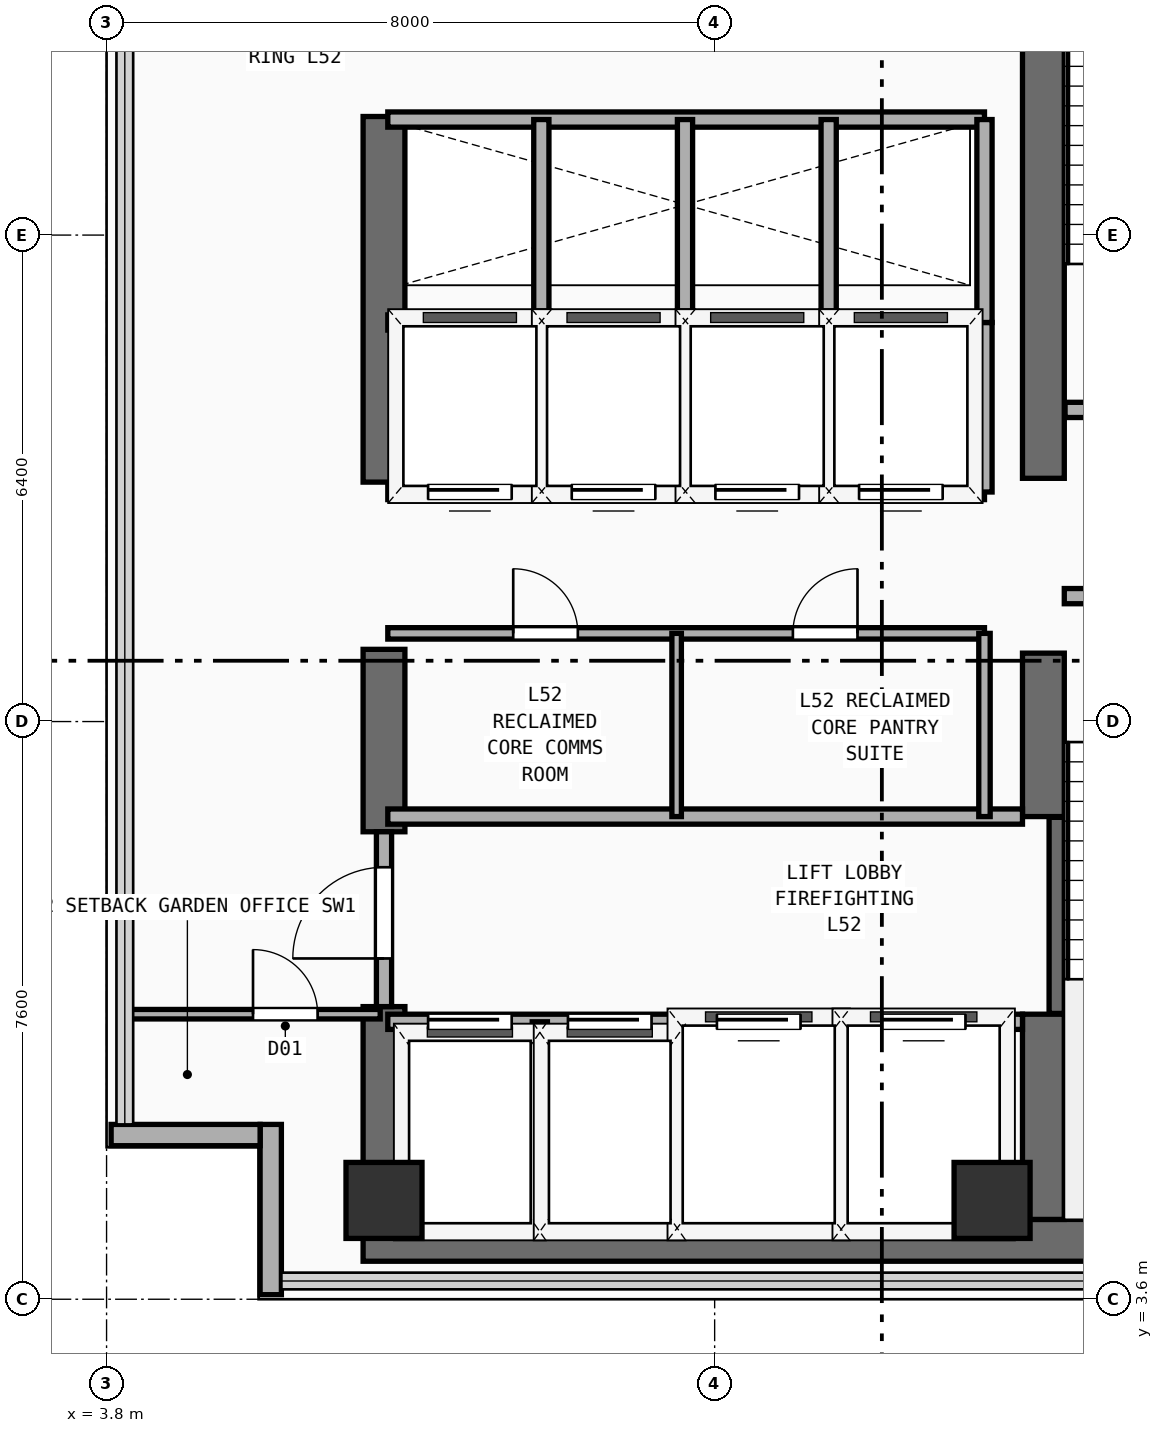
"""IFC4 building model, lengths in metres.
Left out: names, types, materials, properties, quantities, classifications, styles, units other than length and angle.
Written with IfcOpenShell. Run it as: python <this file> out.ifc"""

import sys

from ifc_helpers import new_model, si_unit, direction, frame, frame_2d, origin, origin_2d, place, context, subcontext, project, spatial, rectangle, extrude, element, fill, save


model = new_model("IFC4")
c1 = context("Model", 3, precision=1e-05, world=origin(), true_north=direction((0.0, 1.0)))
c2 = subcontext(c1, "Body", "Model", "MODEL_VIEW")
j1 = project(units=[si_unit("LENGTHUNIT", "METRE"), si_unit("PLANEANGLEUNIT", "RADIAN")], contexts=[c1])
p1 = place(None, origin())
s1 = spatial("IfcSite", under=j1, at=p1, CompositionType="ELEMENT")
p2 = place(p1, origin())
s2 = spatial("IfcBuilding", under=s1, at=p2, CompositionType="ELEMENT")
p3 = place(p2, frame((0.0, 0.0, 204.5)))
s3 = spatial("IfcBuildingStorey", under=s2, at=p3, CompositionType="ELEMENT", Elevation=204.5)
p4 = place(p3, frame((7.175, 4.375, 0.0), z_axis=(0.0, 0.0, 1.0), x_axis=(1.0, 0.0, 0.0)))
e1 = element("IfcWall", 1, at=p4, inside=s3, PredefinedType="SHEAR", context=c2, shape_type="SweptSolid", body=[
    extrude(rectangle(XDim=13.9, YDim=0.55, at=frame_2d((6.95, 0.0))), origin(), (0.0, 0.0, 1.0), 3.56),
])
p5 = place(p3, frame((7.45, 4.65, 0.0), z_axis=(0.0, 0.0, 1.0), x_axis=(0.0, 1.0, 0.0)))
e2 = element("IfcWall", 2, at=p5, inside=s3, PredefinedType="SHEAR", context=c2, shape_type="SweptSolid", body=[
    extrude(rectangle(XDim=2.8, YDim=0.55, at=frame_2d((1.4, 0.0))), origin(), (0.0, 0.0, 1.0), 3.56),
])
p6 = place(p3, frame((7.45, 9.75, 0.0), z_axis=(0.0, 0.0, 1.0), x_axis=(0.0, 1.0, 0.0)))
e3 = element("IfcWall", 3, at=p6, inside=s3, PredefinedType="SHEAR", context=c2, shape_type="SweptSolid", body=[
    extrude(rectangle(XDim=2.4, YDim=0.55, at=frame_2d((1.2, 0.0))), origin(), (0.0, 0.0, 1.0), 3.56),
])
p7 = place(p3, frame((7.45, 14.35, 0.0), z_axis=(0.0, 0.0, 1.0), x_axis=(0.0, 1.0, 0.0)))
e4 = element("IfcWall", 4, at=p7, inside=s3, PredefinedType="SHEAR", context=c2, shape_type="SweptSolid", body=[
    extrude(rectangle(XDim=4.81, YDim=0.55, at=frame_2d((2.405, 0.0))), origin(), (0.0, 0.0, 1.0), 3.56),
])
p8 = place(p3, frame((16.125, 4.65, 0.0), z_axis=(0.0, 0.0, 1.0), x_axis=(0.0, 1.0, 0.0)))
e5 = element("IfcWall", 5, at=p8, inside=s3, PredefinedType="SHEAR", context=c2, shape_type="SweptSolid", body=[
    extrude(rectangle(XDim=2.7, YDim=0.55, at=frame_2d((1.35, 0.0))), origin(), (0.0, 0.0, 1.0), 3.56),
])
p9 = place(p3, frame((16.125, 9.95, 0.0), z_axis=(0.0, 0.0, 1.0), x_axis=(0.0, 1.0, 0.0)))
e6 = element("IfcWall", 6, at=p9, inside=s3, PredefinedType="SHEAR", context=c2, shape_type="SweptSolid", body=[
    extrude(rectangle(XDim=2.15, YDim=0.55, at=frame_2d((1.075, 0.0))), origin(), (0.0, 0.0, 1.0), 3.56),
])
p10 = place(p3, frame((16.125, 14.4, 0.0), z_axis=(0.0, 0.0, 1.0), x_axis=(0.0, 1.0, 0.0)))
e7 = element("IfcWall", 7, at=p10, inside=s3, PredefinedType="SHEAR", context=c2, shape_type="SweptSolid", body=[
    extrude(rectangle(XDim=9.1, YDim=0.55, at=frame_2d((4.55, 0.0))), origin(), (0.0, 0.0, 1.0), 3.56),
])
for number, where, z_axis, x_axis in (
    (8, (7.45, 4.9, 0.0), (0.0, 0.0, 1.0), (1.0, 0.0, 0.0)),
    (9, (15.45, 4.9, 0.0), (0.0, 0.0, 1.0), (1.0, 0.0, 0.0)),
):
    element("IfcColumn", number, at=place(p3, frame(where, z_axis=z_axis, x_axis=x_axis)), inside=s3, PredefinedType="COLUMN", context=c2, shape_type="SweptSolid", body=[
        extrude(rectangle(XDim=1.0, YDim=1.0, at=origin_2d()), origin(), (0.0, 0.0, 1.0), 3.56),
    ])
p11 = place(p3, frame((5.96, 3.66, 0.0), z_axis=(0.0, 0.0, 1.0), x_axis=(0.0, 1.0, 0.0)))
e10 = element("IfcWall", 10, at=p11, inside=s3, PredefinedType="SOLIDWALL", context=c2, shape_type="SweptSolid", body=[
    extrude(rectangle(XDim=2.24, YDim=0.28, at=frame_2d((1.12, 0.0))), origin(), (0.0, 0.0, 1.0), 3.56),
])
p12 = place(p3, frame((3.86, 5.76, 0.0), z_axis=(0.0, 0.0, 1.0), x_axis=(1.0, 0.0, 0.0)))
e11 = element("IfcWall", 11, at=p12, inside=s3, PredefinedType="SOLIDWALL", context=c2, shape_type="SweptSolid", body=[
    extrude(rectangle(XDim=1.96, YDim=0.28, at=frame_2d((0.98, 0.0))), origin(), (0.0, 0.0, 1.0), 3.56),
])
p13 = place(p3, frame((16.3, 7.36, 0.0), z_axis=(0.0, 0.0, 1.0), x_axis=(0.0, 1.0, 0.0)))
e12 = element("IfcWall", 12, at=p13, inside=s3, PredefinedType="SHEAR", context=c2, shape_type="SweptSolid", body=[
    extrude(rectangle(XDim=2.58, YDim=0.2, at=frame_2d((1.29, 0.0))), origin(), (0.0, 0.0, 1.0), 3.56),
])
p14 = place(p3, frame((16.4, 12.85, 0.0), z_axis=(0.0, 0.0, 1.0), x_axis=(1.0, 0.0, 0.0)))
e13 = element("IfcWall", 13, at=p14, inside=s3, PredefinedType="PARTITIONING", context=c2, shape_type="SweptSolid", body=[
    extrude(rectangle(XDim=3.96, YDim=0.2, at=frame_2d((1.98, 0.0))), origin(), (0.0, 0.0, 1.0), 3.56),
])
p15 = place(p14, frame((1.304, 0.0, 0.0)))
e14 = element("IfcOpeningElement", 14, at=p15, cuts=e13, PredefinedType="OPENING", context=c2, shape_type="SweptSolid", body=[
    extrude(rectangle(XDim=1.1, YDim=2.2, at=frame_2d((0.55, 1.1))), frame((0.0, 0.11, 0.0), z_axis=(0.0, -1.0, 0.0), x_axis=(1.0, 0.0, 0.0)), (0.0, 0.0, 1.0), 0.22),
])
p16 = place(p3, frame((16.41, 15.3, 0.0), z_axis=(0.0, 0.0, 1.0), x_axis=(1.0, 0.0, 0.0)))
e15 = element("IfcWall", 15, at=p16, inside=s3, PredefinedType="PARTITIONING", context=c2, shape_type="SweptSolid", body=[
    extrude(rectangle(XDim=3.95, YDim=0.2, at=frame_2d((1.975, 0.0))), origin(), (0.0, 0.0, 1.0), 3.56),
])
p17 = place(p16, frame((1.294, 0.0, 0.0)))
e16 = element("IfcOpeningElement", 16, at=p17, cuts=e15, PredefinedType="OPENING", context=c2, shape_type="SweptSolid", body=[
    extrude(rectangle(XDim=1.1, YDim=2.2, at=frame_2d((0.55, 1.1))), frame((0.0, 0.11, 0.0), z_axis=(0.0, -1.0, 0.0), x_axis=(1.0, 0.0, 0.0)), (0.0, 0.0, 1.0), 0.22),
])
p18 = place(p3, frame((7.5, 7.25, 0.0), z_axis=(0.0, 0.0, 1.0), x_axis=(1.0, 0.0, 0.0)))
e17 = element("IfcWall", 17, at=p18, inside=s3, PredefinedType="PARTITIONING", context=c2, shape_type="SweptSolid", body=[
    extrude(rectangle(XDim=8.35, YDim=0.2, at=frame_2d((4.175, 0.0))), origin(), (0.0, 0.0, 1.0), 3.56),
])
p19 = place(p18, frame((0.53, 0.0, 0.0)))
e18 = element("IfcOpeningElement", 18, at=p19, cuts=e17, PredefinedType="OPENING", context=c2, shape_type="SweptSolid", body=[
    extrude(rectangle(XDim=1.1, YDim=2.2, at=frame_2d((0.55, 1.1))), frame((0.0, 0.11, 0.0), z_axis=(0.0, -1.0, 0.0), x_axis=(1.0, 0.0, 0.0)), (0.0, 0.0, 1.0), 0.22),
])
p20 = place(p18, frame((2.37, 0.0, 0.0)))
e19 = element("IfcOpeningElement", 19, at=p20, cuts=e17, PredefinedType="OPENING", context=c2, shape_type="SweptSolid", body=[
    extrude(rectangle(XDim=1.1, YDim=2.2, at=frame_2d((0.55, 1.1))), frame((0.0, 0.11, 0.0), z_axis=(0.0, -1.0, 0.0), x_axis=(1.0, 0.0, 0.0)), (0.0, 0.0, 1.0), 0.22),
])
p21 = place(p18, frame((4.33, 0.0, 0.0)))
e20 = element("IfcOpeningElement", 20, at=p21, cuts=e17, PredefinedType="OPENING", context=c2, shape_type="SweptSolid", body=[
    extrude(rectangle(XDim=1.1, YDim=2.2, at=frame_2d((0.55, 1.1))), frame((0.0, 0.11, 0.0), z_axis=(0.0, -1.0, 0.0), x_axis=(1.0, 0.0, 0.0)), (0.0, 0.0, 1.0), 0.22),
])
p22 = place(p18, frame((6.5, 0.0, 0.0)))
e21 = element("IfcOpeningElement", 21, at=p22, cuts=e17, PredefinedType="OPENING", context=c2, shape_type="SweptSolid", body=[
    extrude(rectangle(XDim=1.1, YDim=2.2, at=frame_2d((0.55, 1.1))), frame((0.0, 0.11, 0.0), z_axis=(0.0, -1.0, 0.0), x_axis=(1.0, 0.0, 0.0)), (0.0, 0.0, 1.0), 0.22),
])
p23 = place(p3, frame((7.5, 9.95, 0.0), z_axis=(0.0, 0.0, 1.0), x_axis=(1.0, 0.0, 0.0)))
e22 = element("IfcWall", 22, at=p23, inside=s3, PredefinedType="PARTITIONING", context=c2, shape_type="SweptSolid", body=[
    extrude(rectangle(XDim=8.35, YDim=0.2, at=frame_2d((4.175, 0.0))), origin(), (0.0, 0.0, 1.0), 3.56),
])
for number, where, z_axis, x_axis in (
    (23, (9.5, 4.45, 0.0), (0.0, 0.0, 1.0), (0.0, 1.0, 0.0)),
    (24, (11.36, 4.45, 0.0), (0.0, 0.0, 1.0), (0.0, 1.0, 0.0)),
    (25, (13.46, 4.45, 0.0), (0.0, 0.0, 1.0), (0.0, 1.0, 0.0)),
):
    element("IfcWall", number, at=place(p3, frame(where, z_axis=z_axis, x_axis=x_axis)), inside=s3, PredefinedType="PARTITIONING", context=c2, shape_type="SweptSolid", body=[
        extrude(rectangle(XDim=2.8, YDim=0.2, at=frame_2d((1.4, 0.0))), origin(), (0.0, 0.0, 1.0), 3.56),
    ])
p24 = place(p3, frame((7.45, 7.45, 0.0), z_axis=(0.0, 0.0, 1.0), x_axis=(0.0, 1.0, 0.0)))
e26 = element("IfcWall", 26, at=p24, inside=s3, PredefinedType="PARTITIONING", context=c2, shape_type="SweptSolid", body=[
    extrude(rectangle(XDim=2.3, YDim=0.2, at=frame_2d((1.15, 0.0))), origin(), (0.0, 0.0, 1.0), 2.54),
])
p25 = place(p24, frame((0.633, 0.0, 0.0)))
e27 = element("IfcOpeningElement", 27, at=p25, cuts=e26, PredefinedType="OPENING", context=c2, shape_type="SweptSolid", body=[
    extrude(rectangle(XDim=1.2, YDim=2.25, at=frame_2d((0.6, 1.125))), frame((0.0, 0.11, 0.0), z_axis=(0.0, -1.0, 0.0), x_axis=(1.0, 0.0, 0.0)), (0.0, 0.0, 1.0), 0.22),
])
p26 = place(p3, frame((7.5, 12.36, 0.0), z_axis=(0.0, 0.0, 1.0), x_axis=(1.0, 0.0, 0.0)))
e28 = element("IfcWall", 28, at=p26, inside=s3, PredefinedType="PARTITIONING", context=c2, shape_type="SweptSolid", body=[
    extrude(rectangle(XDim=7.85, YDim=0.15, at=frame_2d((3.925, 0.0))), origin(), (0.0, 0.0, 1.0), 3.56),
])
p27 = place(p26, frame((1.65, 0.0, 0.0)))
e29 = element("IfcOpeningElement", 29, at=p27, cuts=e28, PredefinedType="OPENING", context=c2, shape_type="SweptSolid", body=[
    extrude(rectangle(XDim=0.85, YDim=2.15, at=frame_2d((0.425, 1.075))), frame((0.0, 0.085, 0.0), z_axis=(0.0, -1.0, 0.0), x_axis=(1.0, 0.0, 0.0)), (0.0, 0.0, 1.0), 0.17),
])
p28 = place(p26, frame((5.329, 0.0, 0.0)))
e30 = element("IfcOpeningElement", 30, at=p28, cuts=e28, PredefinedType="OPENING", context=c2, shape_type="SweptSolid", body=[
    extrude(rectangle(XDim=0.85, YDim=2.15, at=frame_2d((0.425, 1.075))), frame((0.0, 0.085, 0.0), z_axis=(0.0, -1.0, 0.0), x_axis=(1.0, 0.0, 0.0)), (0.0, 0.0, 1.0), 0.17),
])
p29 = place(p3, frame((15.35, 9.95, 0.0), z_axis=(0.0, 0.0, 1.0), x_axis=(0.0, 1.0, 0.0)))
e31 = element("IfcWall", 31, at=p29, inside=s3, PredefinedType="PARTITIONING", context=c2, shape_type="SweptSolid", body=[
    extrude(rectangle(XDim=2.41, YDim=0.15, at=frame_2d((1.205, 0.0))), origin(), (0.0, 0.0, 1.0), 3.56),
])
p30 = place(p3, frame((11.3, 9.95, 0.0), z_axis=(0.0, 0.0, 1.0), x_axis=(0.0, 1.0, 0.0)))
e32 = element("IfcWall", 32, at=p30, inside=s3, PredefinedType="PARTITIONING", context=c2, shape_type="SweptSolid", body=[
    extrude(rectangle(XDim=2.41, YDim=0.125, at=frame_2d((1.205, 0.0))), origin(), (0.0, 0.0, 1.0), 3.56),
])
p31 = place(p3, frame((7.5, 14.22, 0.0), z_axis=(0.0, 0.0, 1.0), x_axis=(1.0, 0.0, 0.0)))
e33 = element("IfcWall", 33, at=p31, inside=s3, PredefinedType="PARTITIONING", context=c2, shape_type="SweptSolid", body=[
    extrude(rectangle(XDim=7.85, YDim=0.2, at=frame_2d((3.925, 0.0))), origin(), (0.0, 0.0, 1.0), 3.56),
])
p32 = place(p31, frame((0.53, 0.0, 0.0)))
e34 = element("IfcOpeningElement", 34, at=p32, cuts=e33, PredefinedType="OPENING", context=c2, shape_type="SweptSolid", body=[
    extrude(rectangle(XDim=1.1, YDim=2.2, at=frame_2d((0.55, 1.1))), frame((0.0, 0.11, 0.0), z_axis=(0.0, -1.0, 0.0), x_axis=(1.0, 0.0, 0.0)), (0.0, 0.0, 1.0), 0.22),
])
p33 = place(p31, frame((2.42, 0.0, 0.0)))
e35 = element("IfcOpeningElement", 35, at=p33, cuts=e33, PredefinedType="OPENING", context=c2, shape_type="SweptSolid", body=[
    extrude(rectangle(XDim=1.1, YDim=2.2, at=frame_2d((0.55, 1.1))), frame((0.0, 0.11, 0.0), z_axis=(0.0, -1.0, 0.0), x_axis=(1.0, 0.0, 0.0)), (0.0, 0.0, 1.0), 0.22),
])
p34 = place(p31, frame((4.31, 0.0, 0.0)))
e36 = element("IfcOpeningElement", 36, at=p34, cuts=e33, PredefinedType="OPENING", context=c2, shape_type="SweptSolid", body=[
    extrude(rectangle(XDim=1.1, YDim=2.2, at=frame_2d((0.55, 1.1))), frame((0.0, 0.11, 0.0), z_axis=(0.0, -1.0, 0.0), x_axis=(1.0, 0.0, 0.0)), (0.0, 0.0, 1.0), 0.22),
])
p35 = place(p31, frame((6.2, 0.0, 0.0)))
e37 = element("IfcOpeningElement", 37, at=p35, cuts=e33, PredefinedType="OPENING", context=c2, shape_type="SweptSolid", body=[
    extrude(rectangle(XDim=1.1, YDim=2.2, at=frame_2d((0.55, 1.1))), frame((0.0, 0.11, 0.0), z_axis=(0.0, -1.0, 0.0), x_axis=(1.0, 0.0, 0.0)), (0.0, 0.0, 1.0), 0.22),
])
p36 = place(p3, frame((7.5, 16.45, 0.0), z_axis=(0.0, 0.0, 1.0), x_axis=(1.0, 0.0, 0.0)))
e38 = element("IfcWall", 38, at=p36, inside=s3, PredefinedType="PARTITIONING", context=c2, shape_type="SweptSolid", body=[
    extrude(rectangle(XDim=7.85, YDim=0.2, at=frame_2d((3.925, 0.0))), origin(), (0.0, 0.0, 1.0), 3.56),
])
for number, where, z_axis, x_axis in (
    (39, (15.35, 14.22, 0.0), (0.0, 0.0, 1.0), (0.0, 1.0, 0.0)),
    (40, (9.52, 14.22, 0.0), (0.0, 0.0, 1.0), (0.0, 1.0, 0.0)),
    (41, (11.41, 14.22, 0.0), (0.0, 0.0, 1.0), (0.0, 1.0, 0.0)),
    (42, (13.3, 14.22, 0.0), (0.0, 0.0, 1.0), (0.0, 1.0, 0.0)),
):
    element("IfcWall", number, at=place(p3, frame(where, z_axis=z_axis, x_axis=x_axis)), inside=s3, PredefinedType="PARTITIONING", context=c2, shape_type="SweptSolid", body=[
        extrude(rectangle(XDim=2.23, YDim=0.2, at=frame_2d((1.115, 0.0))), origin(), (0.0, 0.0, 1.0), 3.56),
    ])
p37 = place(p3, frame((7.5, 19.12, 0.0), z_axis=(0.0, 0.0, 1.0), x_axis=(1.0, 0.0, 0.0)))
e43 = element("IfcWall", 43, at=p37, inside=s3, PredefinedType="PARTITIONING", context=c2, shape_type="SweptSolid", body=[
    extrude(rectangle(XDim=7.85, YDim=0.2, at=frame_2d((3.925, 0.0))), origin(), (0.0, 0.0, 1.0), 3.56),
])
for number, where, z_axis, x_axis in (
    (44, (15.35, 16.45, 0.0), (0.0, 0.0, 1.0), (0.0, 1.0, 0.0)),
    (45, (9.52, 16.45, 0.0), (0.0, 0.0, 1.0), (0.0, 1.0, 0.0)),
    (46, (11.41, 16.45, 0.0), (0.0, 0.0, 1.0), (0.0, 1.0, 0.0)),
    (47, (13.3, 16.45, 0.0), (0.0, 0.0, 1.0), (0.0, 1.0, 0.0)),
):
    element("IfcWall", number, at=place(p3, frame(where, z_axis=z_axis, x_axis=x_axis)), inside=s3, PredefinedType="PARTITIONING", context=c2, shape_type="SweptSolid", body=[
        extrude(rectangle(XDim=2.67, YDim=0.2, at=frame_2d((1.335, 0.0))), origin(), (0.0, 0.0, 1.0), 3.56),
    ])
p38 = place(p3, frame((4.04, 7.35, 0.0), z_axis=(0.0, 0.0, 1.0), x_axis=(1.0, 0.0, 0.0)))
e48 = element("IfcWall", 48, at=p38, inside=s3, PredefinedType="PARTITIONING", context=c2, shape_type="SweptSolid", body=[
    extrude(rectangle(XDim=3.36, YDim=0.125, at=frame_2d((1.68, 0.0))), origin(), (0.0, 0.0, 1.0), 3.56),
])
p39 = place(p38, frame((1.687, 0.0, 0.0)))
e49 = element("IfcOpeningElement", 49, at=p39, cuts=e48, PredefinedType="OPENING", context=c2, shape_type="SweptSolid", body=[
    extrude(rectangle(XDim=0.85, YDim=2.15, at=frame_2d((0.425, 1.075))), frame((0.0, 0.073, 0.0), z_axis=(0.0, -1.0, 0.0), x_axis=(1.0, 0.0, 0.0)), (0.0, 0.0, 1.0), 0.145),
])
p40 = place(p19, origin())
e50 = element("IfcDoor", 50, at=p40, inside=s3, OperationType="SLIDING_TO_LEFT", PredefinedType="DOOR", context=c2, shape_type="SweptSolid", body=[
    extrude(rectangle(XDim=1.1, YDim=2.2, at=frame_2d((0.55, 1.1))), frame((0.0, 0.025, 0.0), z_axis=(0.0, -1.0, 0.0), x_axis=(1.0, 0.0, 0.0)), (0.0, 0.0, 1.0), 0.05),
])
fill(e18, e50)
p41 = place(p20, origin())
e51 = element("IfcDoor", 51, at=p41, inside=s3, OperationType="SLIDING_TO_LEFT", PredefinedType="DOOR", context=c2, shape_type="SweptSolid", body=[
    extrude(rectangle(XDim=1.1, YDim=2.2, at=frame_2d((0.55, 1.1))), frame((0.0, 0.025, 0.0), z_axis=(0.0, -1.0, 0.0), x_axis=(1.0, 0.0, 0.0)), (0.0, 0.0, 1.0), 0.05),
])
fill(e19, e51)
p42 = place(p21, origin())
e52 = element("IfcDoor", 52, at=p42, inside=s3, OperationType="SLIDING_TO_LEFT", PredefinedType="DOOR", context=c2, shape_type="SweptSolid", body=[
    extrude(rectangle(XDim=1.1, YDim=2.2, at=frame_2d((0.55, 1.1))), frame((0.0, 0.025, 0.0), z_axis=(0.0, -1.0, 0.0), x_axis=(1.0, 0.0, 0.0)), (0.0, 0.0, 1.0), 0.05),
])
fill(e20, e52)
p43 = place(p22, origin())
e53 = element("IfcDoor", 53, at=p43, inside=s3, OperationType="SLIDING_TO_LEFT", PredefinedType="DOOR", context=c2, shape_type="SweptSolid", body=[
    extrude(rectangle(XDim=1.1, YDim=2.2, at=frame_2d((0.55, 1.1))), frame((0.0, 0.025, 0.0), z_axis=(0.0, -1.0, 0.0), x_axis=(1.0, 0.0, 0.0)), (0.0, 0.0, 1.0), 0.05),
])
fill(e21, e53)
p44 = place(p25, frame((1.2, 0.0, 0.0), z_axis=(0.0, 0.0, 1.0), x_axis=(-1.0, 0.0, 0.0)))
e54 = element("IfcDoor", 54, at=p44, inside=s3, OperationType="SINGLE_SWING_RIGHT", PredefinedType="DOOR", context=c2, shape_type="SweptSolid", body=[
    extrude(rectangle(XDim=1.2, YDim=2.25, at=frame_2d((0.6, 1.125))), frame((0.0, 0.025, 0.0), z_axis=(0.0, -1.0, 0.0), x_axis=(1.0, 0.0, 0.0)), (0.0, 0.0, 1.0), 0.05),
])
fill(e27, e54)
p45 = place(p27, origin())
e55 = element("IfcDoor", 55, at=p45, inside=s3, OperationType="SINGLE_SWING_LEFT", PredefinedType="DOOR", context=c2, shape_type="SweptSolid", body=[
    extrude(rectangle(XDim=0.85, YDim=2.15, at=frame_2d((0.425, 1.075))), frame((0.0, 0.025, 0.0), z_axis=(0.0, -1.0, 0.0), x_axis=(1.0, 0.0, 0.0)), (0.0, 0.0, 1.0), 0.05),
])
fill(e29, e55)
p46 = place(p28, origin())
e56 = element("IfcDoor", 56, at=p46, inside=s3, OperationType="SINGLE_SWING_RIGHT", PredefinedType="DOOR", context=c2, shape_type="SweptSolid", body=[
    extrude(rectangle(XDim=0.85, YDim=2.15, at=frame_2d((0.425, 1.075))), frame((0.0, 0.025, 0.0), z_axis=(0.0, -1.0, 0.0), x_axis=(1.0, 0.0, 0.0)), (0.0, 0.0, 1.0), 0.05),
])
fill(e30, e56)
p47 = place(p32, frame((1.1, 0.0, 0.0), z_axis=(0.0, 0.0, 1.0), x_axis=(-1.0, 0.0, 0.0)))
e57 = element("IfcDoor", 57, at=p47, inside=s3, OperationType="SLIDING_TO_LEFT", PredefinedType="DOOR", context=c2, shape_type="SweptSolid", body=[
    extrude(rectangle(XDim=1.1, YDim=2.2, at=frame_2d((0.55, 1.1))), frame((0.0, 0.025, 0.0), z_axis=(0.0, -1.0, 0.0), x_axis=(1.0, 0.0, 0.0)), (0.0, 0.0, 1.0), 0.05),
])
fill(e34, e57)
p48 = place(p33, frame((1.1, 0.0, 0.0), z_axis=(0.0, 0.0, 1.0), x_axis=(-1.0, 0.0, 0.0)))
e58 = element("IfcDoor", 58, at=p48, inside=s3, OperationType="SLIDING_TO_LEFT", PredefinedType="DOOR", context=c2, shape_type="SweptSolid", body=[
    extrude(rectangle(XDim=1.1, YDim=2.2, at=frame_2d((0.55, 1.1))), frame((0.0, 0.025, 0.0), z_axis=(0.0, -1.0, 0.0), x_axis=(1.0, 0.0, 0.0)), (0.0, 0.0, 1.0), 0.05),
])
fill(e35, e58)
p49 = place(p34, frame((1.1, 0.0, 0.0), z_axis=(0.0, 0.0, 1.0), x_axis=(-1.0, 0.0, 0.0)))
e59 = element("IfcDoor", 59, at=p49, inside=s3, OperationType="SLIDING_TO_LEFT", PredefinedType="DOOR", context=c2, shape_type="SweptSolid", body=[
    extrude(rectangle(XDim=1.1, YDim=2.2, at=frame_2d((0.55, 1.1))), frame((0.0, 0.025, 0.0), z_axis=(0.0, -1.0, 0.0), x_axis=(1.0, 0.0, 0.0)), (0.0, 0.0, 1.0), 0.05),
])
fill(e36, e59)
p50 = place(p35, frame((1.1, 0.0, 0.0), z_axis=(0.0, 0.0, 1.0), x_axis=(-1.0, 0.0, 0.0)))
e60 = element("IfcDoor", 60, at=p50, inside=s3, OperationType="SLIDING_TO_LEFT", PredefinedType="DOOR", context=c2, shape_type="SweptSolid", body=[
    extrude(rectangle(XDim=1.1, YDim=2.2, at=frame_2d((0.55, 1.1))), frame((0.0, 0.025, 0.0), z_axis=(0.0, -1.0, 0.0), x_axis=(1.0, 0.0, 0.0)), (0.0, 0.0, 1.0), 0.05),
])
fill(e37, e60)
p51 = place(p39, origin())
e61 = element("IfcDoor", 61, at=p51, inside=s3, OperationType="SINGLE_SWING_LEFT", PredefinedType="DOOR", context=c2, shape_type="SweptSolid", body=[
    extrude(rectangle(XDim=0.85, YDim=2.15, at=frame_2d((0.425, 1.075))), frame((0.0, 0.025, 0.0), z_axis=(0.0, -1.0, 0.0), x_axis=(1.0, 0.0, 0.0)), (0.0, 0.0, 1.0), 0.05),
])
fill(e49, e61)
save(model, sys.argv[1])
